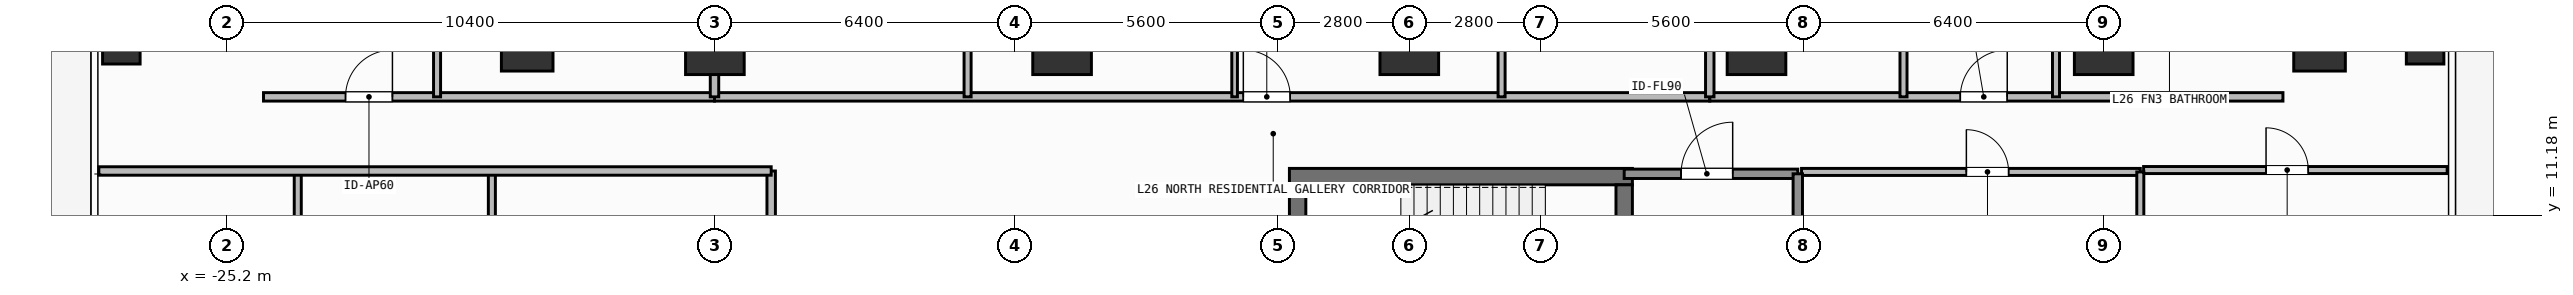
"""IFC4 building model, lengths in metres.
Left out: names, types, materials, properties, quantities, classifications, styles, units other than length and angle.
Written with IfcOpenShell. Run it as: python <this file> out.ifc"""

import sys

from ifc_helpers import new_model, si_unit, direction, frame, frame_2d, origin, origin_2d, place, context, subcontext, project, spatial, rectangle, hollow_rectangle, extrude, element, fill, save


model = new_model("IFC4")
c1 = context("Model", 3, precision=1e-05, world=origin(), true_north=direction((0.0, 1.0)))
c2 = subcontext(c1, "Body", "Model", "MODEL_VIEW")
j1 = project(units=[si_unit("LENGTHUNIT", "METRE"), si_unit("PLANEANGLEUNIT", "RADIAN")], contexts=[c1])
p1 = place(None, origin())
s1 = spatial("IfcSite", under=j1, at=p1, CompositionType="ELEMENT")
p2 = place(p1, origin())
s2 = spatial("IfcBuilding", under=s1, at=p2, CompositionType="ELEMENT")
p3 = place(p2, frame((0.0, 0.0, 104.7)))
s3 = spatial("IfcBuildingStorey", under=s2, at=p3, CompositionType="ELEMENT", Elevation=104.7)
p4 = place(p3, frame((-2.555, 12.0, 0.0), z_axis=(0.0, 0.0, 1.0), x_axis=(1.0, 0.0, 0.0)))
e1 = element("IfcWall", 1, at=p4, inside=s3, PredefinedType="SHEAR", context=c2, shape_type="SweptSolid", body=[
    extrude(rectangle(XDim=7.31, YDim=0.35, at=frame_2d((3.655, 0.0))), origin(), (0.0, 0.0, 1.0), 3.9),
])
p5 = place(p3, frame((-2.38, 8.9, 0.0), z_axis=(0.0, 0.0, 1.0), x_axis=(0.0, 1.0, 0.0)))
e2 = element("IfcWall", 2, at=p5, inside=s3, PredefinedType="SHEAR", context=c2, shape_type="SweptSolid", body=[
    extrude(rectangle(XDim=2.925, YDim=0.35, at=frame_2d((1.462, 0.0))), origin(), (0.0, 0.0, 1.0), 3.9),
])
p6 = place(p3, frame((4.58, 11.825, 0.0), z_axis=(0.0, 0.0, 1.0), x_axis=(0.0, -1.0, 0.0)))
e3 = element("IfcWall", 3, at=p6, inside=s3, PredefinedType="SHEAR", context=c2, shape_type="SweptSolid", body=[
    extrude(rectangle(XDim=2.925, YDim=0.35, at=frame_2d((1.462, 0.0))), origin(), (0.0, 0.0, 1.0), 3.9),
])
p7 = place(p6, frame((0.913, 0.0, 0.0)))
e4 = element("IfcOpeningElement", 4, at=p7, cuts=e3, PredefinedType="OPENING", context=c2, shape_type="SweptSolid", body=[
    extrude(rectangle(XDim=1.1, YDim=2.15, at=frame_2d((0.55, 1.075))), frame((0.0, 0.185, 0.0), z_axis=(0.0, -1.0, 0.0), x_axis=(1.0, 0.0, 0.0)), (0.0, 0.0, 1.0), 0.37),
])
for number, where, z_axis, x_axis in (
    (5, (-14.8, 14.8, 0.0), (0.0, 0.0, 1.0), (1.0, 0.0, 0.0)),
    (6, (-7.4, 14.8, 0.0), (0.0, 0.0, 1.0), (1.0, 0.0, 0.0)),
    (7, (0.0, 14.8, 0.0), (0.0, 0.0, 1.0), (1.0, 0.0, 0.0)),
    (8, (7.4, 14.8, 0.0), (0.0, 0.0, 1.0), (1.0, 0.0, 0.0)),
    (9, (14.8, 14.8, 0.0), (0.0, 0.0, 1.0), (1.0, 0.0, 0.0)),
):
    element("IfcColumn", number, at=place(p3, frame(where, z_axis=z_axis, x_axis=x_axis)), inside=s3, PredefinedType="COLUMN", context=c2, shape_type="SweptSolid", body=[
        extrude(rectangle(XDim=1.25, YDim=1.25, at=origin_2d()), origin(), (0.0, 0.0, 1.0), 3.9),
    ])
for number, where, z_axis, x_axis in (
    (10, (-18.8, 14.8, 0.0), (0.0, 0.0, 1.0), (1.0, 0.0, 0.0)),
    (11, (19.4, 14.8, 0.0), (0.0, 0.0, 1.0), (1.0, 0.0, 0.0)),
):
    element("IfcColumn", number, at=place(p3, frame(where, z_axis=z_axis, x_axis=x_axis)), inside=s3, PredefinedType="COLUMN", context=c2, shape_type="SweptSolid", body=[
        extrude(rectangle(XDim=1.1, YDim=1.1, at=origin_2d()), origin(), (0.0, 0.0, 1.0), 3.9),
    ])
for number, where, z_axis, x_axis in (
    (12, (-27.45, 14.8, 0.0), (0.0, 0.0, 1.0), (1.0, 0.0, 0.0)),
    (13, (21.65, 14.8, 0.0), (0.0, 0.0, 1.0), (1.0, 0.0, 0.0)),
):
    element("IfcColumn", number, at=place(p3, frame(where, z_axis=z_axis, x_axis=x_axis)), inside=s3, PredefinedType="COLUMN", context=c2, shape_type="SweptSolid", body=[
        extrude(hollow_rectangle(XDim=0.8, YDim=0.8, WallThickness=0.036, at=origin_2d()), origin(), (0.0, 0.0, 1.0), 3.9),
    ])
p8 = place(p3, frame((4.58, 12.06, 0.0), z_axis=(0.0, 0.0, 1.0), x_axis=(1.0, 0.0, 0.0)))
e14 = element("IfcWall", 14, at=p8, inside=s3, PredefinedType="SOLIDWALL", context=c2, shape_type="SweptSolid", body=[
    extrude(rectangle(XDim=3.7, YDim=0.2, at=frame_2d((1.85, 0.0))), origin(), (0.0, 0.0, 1.0), 3.62),
])
p9 = place(p8, frame((1.212, 0.0, 0.0)))
e15 = element("IfcOpeningElement", 15, at=p9, cuts=e14, PredefinedType="OPENING", context=c2, shape_type="SweptSolid", body=[
    extrude(rectangle(XDim=1.1, YDim=2.15, at=frame_2d((0.55, 1.075))), frame((0.0, 0.11, 0.0), z_axis=(0.0, -1.0, 0.0), x_axis=(1.0, 0.0, 0.0)), (0.0, 0.0, 1.0), 0.22),
])
p10 = place(p3, frame((8.36, 12.1, 0.0), z_axis=(0.0, 0.0, 1.0), x_axis=(1.0, 0.0, 0.0)))
e16 = element("IfcWall", 16, at=p10, inside=s3, PredefinedType="PARTITIONING", context=c2, shape_type="SweptSolid", body=[
    extrude(rectangle(XDim=7.22, YDim=0.15, at=frame_2d((3.61, 0.0))), origin(), (0.0, 0.0, 1.0), 3.62),
])
p11 = place(p10, frame((3.513, 0.0, 0.0)))
e17 = element("IfcOpeningElement", 17, at=p11, cuts=e16, PredefinedType="OPENING", context=c2, shape_type="SweptSolid", body=[
    extrude(rectangle(XDim=0.9, YDim=2.1, at=frame_2d((0.45, 1.05))), frame((0.0, 0.085, 0.0), z_axis=(0.0, -1.0, 0.0), x_axis=(1.0, 0.0, 0.0)), (0.0, 0.0, 1.0), 0.17),
])
p12 = place(p3, frame((-24.42, 13.7, 0.0), z_axis=(0.0, 0.0, 1.0), x_axis=(1.0, 0.0, 0.0)))
e18 = element("IfcWall", 18, at=p12, inside=s3, PredefinedType="PARTITIONING", context=c2, shape_type="SweptSolid", body=[
    extrude(rectangle(XDim=9.612, YDim=0.18, at=frame_2d((4.806, 0.0))), origin(), (0.0, 0.0, 1.0), 3.62),
])
p13 = place(p12, frame((1.748, 0.0, 0.0)))
e19 = element("IfcOpeningElement", 19, at=p13, cuts=e18, PredefinedType="OPENING", context=c2, shape_type="SweptSolid", body=[
    extrude(rectangle(XDim=1.0, YDim=2.2, at=frame_2d((0.5, 1.1))), frame((0.0, 0.1, 0.0), z_axis=(0.0, -1.0, 0.0), x_axis=(1.0, 0.0, 0.0)), (0.0, 0.0, 1.0), 0.2),
])
p14 = place(p3, frame((-20.721, 13.7, 0.0), z_axis=(0.0, 0.0, 1.0), x_axis=(0.0, 1.0, 0.0)))
e20 = element("IfcWall", 20, at=p14, inside=s3, PredefinedType="PARTITIONING", context=c2, shape_type="SweptSolid", body=[
    extrude(rectangle(XDim=4.651, YDim=0.15, at=frame_2d((2.326, 0.0))), origin(), (0.0, 0.0, 1.0), 3.62),
])
p15 = place(p14, frame((1.9, 0.0, 0.0)))
e21 = element("IfcOpeningElement", 21, at=p15, cuts=e20, PredefinedType="OPENING", context=c2, shape_type="SweptSolid", body=[
    extrude(rectangle(XDim=0.85, YDim=2.1, at=frame_2d((0.425, 1.05))), frame((0.0, 0.085, 0.0), z_axis=(0.0, -1.0, 0.0), x_axis=(1.0, 0.0, 0.0)), (0.0, 0.0, 1.0), 0.17),
])
p16 = place(p3, frame((-14.808, 13.7, 0.0), z_axis=(0.0, 0.0, 1.0), x_axis=(1.0, 0.0, 0.0)))
e22 = element("IfcWall", 22, at=p16, inside=s3, PredefinedType="PARTITIONING", context=c2, shape_type="SweptSolid", body=[
    extrude(rectangle(XDim=21.212, YDim=0.18, at=frame_2d((10.606, 0.0))), origin(), (0.0, 0.0, 1.0), 3.62),
])
p17 = place(p16, frame((11.271, 0.0, 0.0)))
e23 = element("IfcOpeningElement", 23, at=p17, cuts=e22, PredefinedType="OPENING", context=c2, shape_type="SweptSolid", body=[
    extrude(rectangle(XDim=1.0, YDim=2.2, at=frame_2d((0.5, 1.1))), frame((0.0, 0.1, 0.0), z_axis=(0.0, -1.0, 0.0), x_axis=(1.0, 0.0, 0.0)), (0.0, 0.0, 1.0), 0.2),
])
p18 = place(p3, frame((-3.723, 13.7, 0.0), z_axis=(0.0, 0.0, 1.0), x_axis=(0.0, 1.0, 0.0)))
e24 = element("IfcWall", 24, at=p18, inside=s3, PredefinedType="PARTITIONING", context=c2, shape_type="SweptSolid", body=[
    extrude(rectangle(XDim=12.89, YDim=0.12, at=frame_2d((6.445, 0.0))), origin(), (0.0, 0.0, 1.0), 3.62),
])
p19 = place(p18, frame((5.905, 0.0, 0.0)))
e25 = element("IfcOpeningElement", 25, at=p19, cuts=e24, PredefinedType="OPENING", context=c2, shape_type="SweptSolid", body=[
    extrude(rectangle(XDim=0.9, YDim=2.1, at=frame_2d((0.45, 1.05))), frame((0.0, 0.07, 0.0), z_axis=(0.0, -1.0, 0.0), x_axis=(1.0, 0.0, 0.0)), (0.0, 0.0, 1.0), 0.14),
])
p20 = place(p3, frame((-9.414, 13.7, 0.0), z_axis=(0.0, 0.0, 1.0), x_axis=(0.0, 1.0, 0.0)))
e26 = element("IfcWall", 26, at=p20, inside=s3, PredefinedType="PARTITIONING", context=c2, shape_type="SweptSolid", body=[
    extrude(rectangle(XDim=6.303, YDim=0.15, at=frame_2d((3.151, 0.0))), origin(), (0.0, 0.0, 1.0), 3.62),
])
p21 = place(p20, frame((2.638, 0.0, 0.0)))
e27 = element("IfcOpeningElement", 27, at=p21, cuts=e26, PredefinedType="OPENING", context=c2, shape_type="SweptSolid", body=[
    extrude(rectangle(XDim=0.85, YDim=2.1, at=frame_2d((0.425, 1.05))), frame((0.0, 0.085, 0.0), z_axis=(0.0, -1.0, 0.0), x_axis=(1.0, 0.0, 0.0)), (0.0, 0.0, 1.0), 0.17),
])
p22 = place(p3, frame((1.967, 13.7, 0.0), z_axis=(0.0, 0.0, 1.0), x_axis=(0.0, 1.0, 0.0)))
e28 = element("IfcWall", 28, at=p22, inside=s3, PredefinedType="PARTITIONING", context=c2, shape_type="SweptSolid", body=[
    extrude(rectangle(XDim=3.48, YDim=0.15, at=frame_2d((1.74, 0.0))), origin(), (0.0, 0.0, 1.0), 3.62),
])
p23 = place(p22, frame((1.937, 0.0, 0.0)))
e29 = element("IfcOpeningElement", 29, at=p23, cuts=e28, PredefinedType="OPENING", context=c2, shape_type="SweptSolid", body=[
    extrude(rectangle(XDim=0.85, YDim=2.1, at=frame_2d((0.425, 1.05))), frame((0.0, 0.085, 0.0), z_axis=(0.0, -1.0, 0.0), x_axis=(1.0, 0.0, 0.0)), (0.0, 0.0, 1.0), 0.17),
])
p24 = place(p3, frame((6.404, 13.7, 0.0), z_axis=(0.0, 0.0, 1.0), x_axis=(1.0, 0.0, 0.0)))
e30 = element("IfcWall", 30, at=p24, inside=s3, PredefinedType="PARTITIONING", context=c2, shape_type="SweptSolid", body=[
    extrude(rectangle(XDim=12.216, YDim=0.18, at=frame_2d((6.108, 0.0))), origin(), (0.0, 0.0, 1.0), 3.62),
])
p25 = place(p24, frame((5.34, 0.0, 0.0)))
e31 = element("IfcOpeningElement", 31, at=p25, cuts=e30, PredefinedType="OPENING", context=c2, shape_type="SweptSolid", body=[
    extrude(rectangle(XDim=1.0, YDim=2.2, at=frame_2d((0.5, 1.1))), frame((0.0, 0.1, 0.0), z_axis=(0.0, -1.0, 0.0), x_axis=(1.0, 0.0, 0.0)), (0.0, 0.0, 1.0), 0.2),
])
p26 = place(p3, frame((10.533, 13.7, 0.0), z_axis=(0.0, 0.0, 1.0), x_axis=(0.0, 1.0, 0.0)))
e32 = element("IfcWall", 32, at=p26, inside=s3, PredefinedType="PARTITIONING", context=c2, shape_type="SweptSolid", body=[
    extrude(rectangle(XDim=7.476, YDim=0.15, at=frame_2d((3.738, 0.0))), origin(), (0.0, 0.0, 1.0), 3.62),
])
p27 = place(p26, frame((3.313, 0.0, 0.0)))
e33 = element("IfcOpeningElement", 33, at=p27, cuts=e32, PredefinedType="OPENING", context=c2, shape_type="SweptSolid", body=[
    extrude(rectangle(XDim=0.85, YDim=2.1, at=frame_2d((0.425, 1.05))), frame((0.0, 0.085, 0.0), z_axis=(0.0, -1.0, 0.0), x_axis=(1.0, 0.0, 0.0)), (0.0, 0.0, 1.0), 0.17),
])
p28 = place(p3, frame((13.783, 13.7, 0.0), z_axis=(0.0, 0.0, 1.0), x_axis=(0.0, 1.0, 0.0)))
e34 = element("IfcWall", 34, at=p28, inside=s3, PredefinedType="PARTITIONING", context=c2, shape_type="SweptSolid", body=[
    extrude(rectangle(XDim=3.48, YDim=0.15, at=frame_2d((1.74, 0.0))), origin(), (0.0, 0.0, 1.0), 3.62),
])
p29 = place(p28, frame((1.937, 0.0, 0.0)))
e35 = element("IfcOpeningElement", 35, at=p29, cuts=e34, PredefinedType="OPENING", context=c2, shape_type="SweptSolid", body=[
    extrude(rectangle(XDim=0.85, YDim=2.1, at=frame_2d((0.425, 1.05))), frame((0.0, 0.085, 0.0), z_axis=(0.0, -1.0, 0.0), x_axis=(1.0, 0.0, 0.0)), (0.0, 0.0, 1.0), 0.17),
])
p30 = place(p3, frame((-13.6, -1.6, 0.0), z_axis=(0.0, 0.0, 1.0), x_axis=(0.0, 1.0, 0.0)))
e36 = element("IfcWall", 36, at=p30, inside=s3, PredefinedType="PARTITIONING", context=c2, shape_type="SweptSolid", body=[
    extrude(rectangle(XDim=13.72, YDim=0.18, at=frame_2d((6.86, 0.0))), origin(), (0.0, 0.0, 1.0), 3.62),
])
p31 = place(p30, frame((6.989, 0.0, 0.0)))
e37 = element("IfcOpeningElement", 37, at=p31, cuts=e36, PredefinedType="OPENING", context=c2, shape_type="SweptSolid", body=[
    extrude(rectangle(XDim=1.0, YDim=2.2, at=frame_2d((0.5, 1.1))), frame((0.0, 0.1, 0.0), z_axis=(0.0, -1.0, 0.0), x_axis=(1.0, 0.0, 0.0)), (0.0, 0.0, 1.0), 0.2),
])
p32 = place(p3, frame((15.65, 12.14, 0.0), z_axis=(0.0, 0.0, 1.0), x_axis=(1.0, 0.0, 0.0)))
e38 = element("IfcWall", 38, at=p32, inside=s3, PredefinedType="PARTITIONING", context=c2, shape_type="SweptSolid", body=[
    extrude(rectangle(XDim=6.47, YDim=0.15, at=frame_2d((3.235, 0.0))), origin(), (0.0, 0.0, 1.0), 3.62),
])
p33 = place(p32, frame((2.61, 0.0, 0.0)))
e39 = element("IfcOpeningElement", 39, at=p33, cuts=e38, PredefinedType="OPENING", context=c2, shape_type="SweptSolid", body=[
    extrude(rectangle(XDim=0.9, YDim=2.1, at=frame_2d((0.45, 1.05))), frame((0.0, 0.085, 0.0), z_axis=(0.0, -1.0, 0.0), x_axis=(1.0, 0.0, 0.0)), (0.0, 0.0, 1.0), 0.17),
])
p34 = place(p3, frame((8.28, 8.875, 0.0), z_axis=(0.0, 0.0, 1.0), x_axis=(0.0, 1.0, 0.0)))
e40 = element("IfcWall", 40, at=p34, inside=s3, PredefinedType="SOLIDWALL", context=c2, shape_type="SweptSolid", body=[
    extrude(rectangle(XDim=3.185, YDim=0.2, at=frame_2d((1.593, 0.0))), origin(), (0.0, 0.0, 1.0), 3.62),
])
p35 = place(p3, frame((15.58, 5.85, 0.0), z_axis=(0.0, 0.0, 1.0), x_axis=(0.0, 1.0, 0.0)))
e41 = element("IfcWall", 41, at=p35, inside=s3, PredefinedType="PARTITIONING", context=c2, shape_type="SweptSolid", body=[
    extrude(rectangle(XDim=6.25, YDim=0.15, at=frame_2d((3.125, 0.0))), origin(), (0.0, 0.0, 1.0), 3.62),
])
p36 = place(p3, frame((-14.808, 13.7, 0.0), z_axis=(0.0, 0.0, 1.0), x_axis=(0.0, 1.0, 0.0)))
e42 = element("IfcWall", 42, at=p36, inside=s3, PredefinedType="PARTITIONING", context=c2, shape_type="SweptSolid", body=[
    extrude(rectangle(XDim=17.13, YDim=0.18, at=frame_2d((8.565, 0.0))), origin(), (0.0, 0.0, 1.0), 2.71),
])
p37 = place(p3, frame((6.404, 13.7, 0.0), z_axis=(0.0, 0.0, 1.0), x_axis=(0.0, 1.0, 0.0)))
e43 = element("IfcWall", 43, at=p37, inside=s3, PredefinedType="PARTITIONING", context=c2, shape_type="SweptSolid", body=[
    extrude(rectangle(XDim=17.13, YDim=0.18, at=frame_2d((8.565, 0.0))), origin(), (0.0, 0.0, 1.0), 3.62),
])
for number, where, z_axis, x_axis in (
    (44, (-19.553, 9.32, 0.0), (0.0, 0.0, 1.0), (0.0, 1.0, 0.0)),
    (45, (-23.69, 9.32, 0.0), (0.0, 0.0, 1.0), (0.0, 1.0, 0.0)),
):
    element("IfcWall", number, at=place(p3, frame(where, z_axis=z_axis, x_axis=x_axis)), inside=s3, PredefinedType="PARTITIONING", context=c2, shape_type="SweptSolid", body=[
        extrude(rectangle(XDim=2.8, YDim=0.15, at=frame_2d((1.4, 0.0))), origin(), (0.0, 0.0, 1.0), 3.62),
    ])
p38 = place(p3, frame((-27.93, 12.12, 0.0), z_axis=(0.0, 0.0, 1.0), x_axis=(1.0, 0.0, 0.0)))
e46 = element("IfcWall", 46, at=p38, inside=s3, PredefinedType="PARTITIONING", context=c2, shape_type="SweptSolid", body=[
    extrude(rectangle(XDim=14.33, YDim=0.18, at=frame_2d((7.165, 0.0))), origin(), (0.0, 0.0, 1.0), 3.62),
])
p39 = place(p9, origin())
e47 = element("IfcDoor", 47, at=p39, inside=s3, OperationType="SINGLE_SWING_RIGHT", PredefinedType="DOOR", context=c2, shape_type="SweptSolid", body=[
    extrude(rectangle(XDim=1.1, YDim=2.15, at=frame_2d((0.55, 1.075))), frame((0.0, 0.025, 0.0), z_axis=(0.0, -1.0, 0.0), x_axis=(1.0, 0.0, 0.0)), (0.0, 0.0, 1.0), 0.05),
])
fill(e15, e47)
p40 = place(p11, origin())
e48 = element("IfcDoor", 48, at=p40, inside=s3, OperationType="SINGLE_SWING_LEFT", PredefinedType="DOOR", context=c2, shape_type="SweptSolid", body=[
    extrude(rectangle(XDim=0.9, YDim=2.1, at=frame_2d((0.45, 1.05))), frame((0.0, 0.025, 0.0), z_axis=(0.0, -1.0, 0.0), x_axis=(1.0, 0.0, 0.0)), (0.0, 0.0, 1.0), 0.05),
])
fill(e17, e48)
p41 = place(p13, origin())
e49 = element("IfcDoor", 49, at=p41, inside=s3, OperationType="SINGLE_SWING_RIGHT", PredefinedType="DOOR", context=c2, shape_type="SweptSolid", body=[
    extrude(rectangle(XDim=1.0, YDim=2.2, at=frame_2d((0.5, 1.1))), frame((0.0, 0.025, 0.0), z_axis=(0.0, -1.0, 0.0), x_axis=(1.0, 0.0, 0.0)), (0.0, 0.0, 1.0), 0.05),
])
fill(e19, e49)
p42 = place(p17, origin())
e50 = element("IfcDoor", 50, at=p42, inside=s3, OperationType="SINGLE_SWING_LEFT", PredefinedType="DOOR", context=c2, shape_type="SweptSolid", body=[
    extrude(rectangle(XDim=1.0, YDim=2.2, at=frame_2d((0.5, 1.1))), frame((0.0, 0.025, 0.0), z_axis=(0.0, -1.0, 0.0), x_axis=(1.0, 0.0, 0.0)), (0.0, 0.0, 1.0), 0.05),
])
fill(e23, e50)
p43 = place(p25, origin())
e51 = element("IfcDoor", 51, at=p43, inside=s3, OperationType="SINGLE_SWING_RIGHT", PredefinedType="DOOR", context=c2, shape_type="SweptSolid", body=[
    extrude(rectangle(XDim=1.0, YDim=2.2, at=frame_2d((0.5, 1.1))), frame((0.0, 0.025, 0.0), z_axis=(0.0, -1.0, 0.0), x_axis=(1.0, 0.0, 0.0)), (0.0, 0.0, 1.0), 0.05),
])
fill(e31, e51)
p44 = place(p33, origin())
e52 = element("IfcDoor", 52, at=p44, inside=s3, OperationType="SINGLE_SWING_LEFT", PredefinedType="DOOR", context=c2, shape_type="SweptSolid", body=[
    extrude(rectangle(XDim=0.9, YDim=2.1, at=frame_2d((0.45, 1.05))), frame((0.0, 0.025, 0.0), z_axis=(0.0, -1.0, 0.0), x_axis=(1.0, 0.0, 0.0)), (0.0, 0.0, 1.0), 0.05),
])
fill(e39, e52)
save(model, sys.argv[1])
